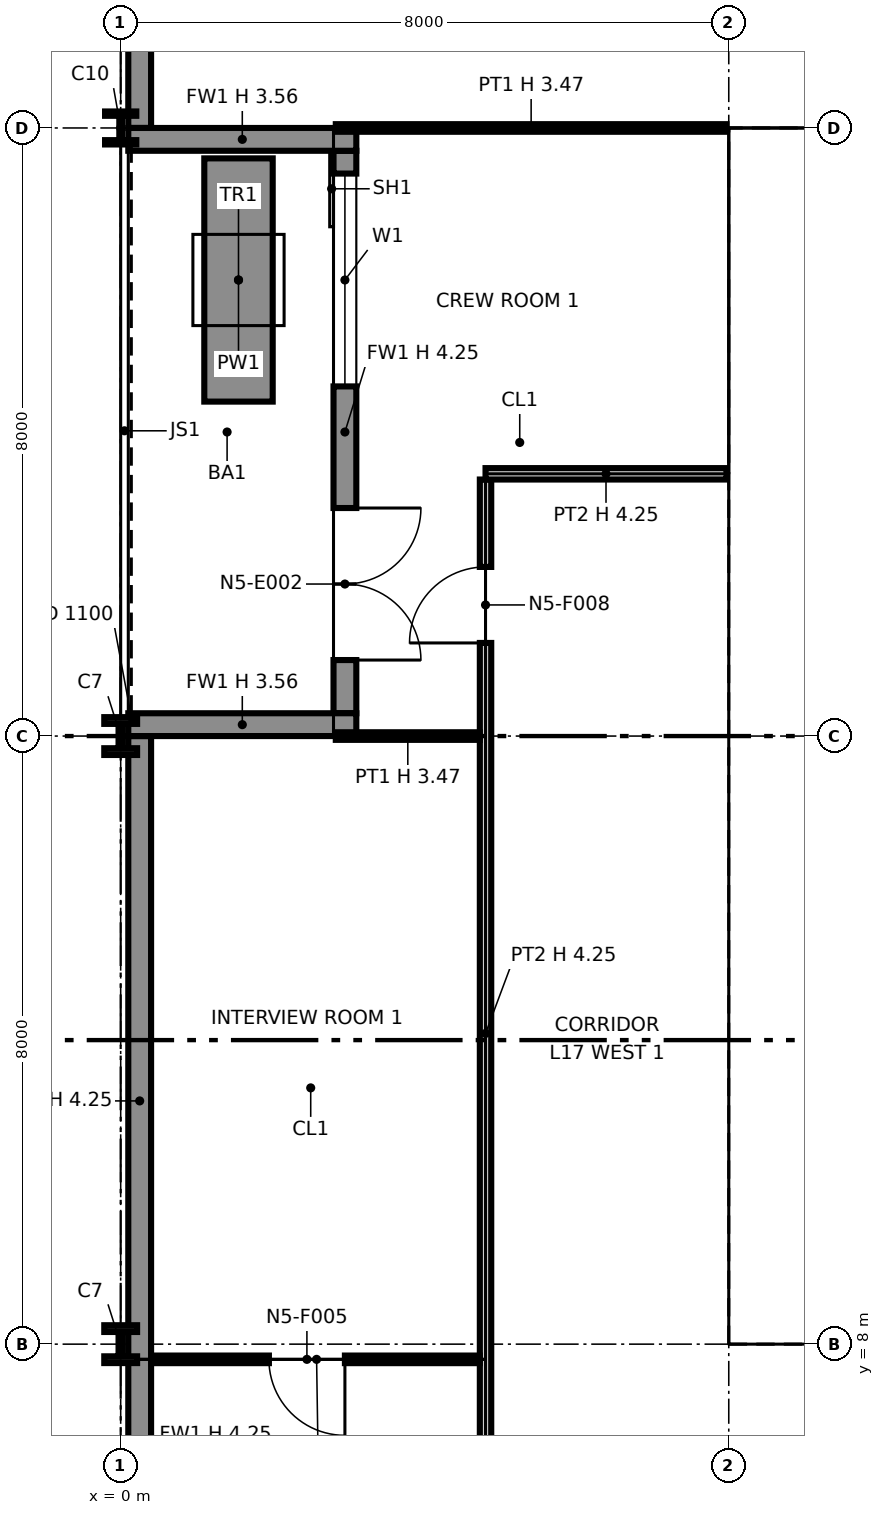
"""IFC4 building model, lengths in metres.
Left out: names, types, materials, properties, quantities, classifications, styles, units other than length and angle.
Written with IfcOpenShell. Run it as: python <this file> out.ifc"""

import sys

from ifc_helpers import new_model, si_unit, direction, frame, frame_2d, origin, origin_2d, place, context, subcontext, project, spatial, polyline, rectangle, i_section, outline, extrude, element, fill, save


model = new_model("IFC4")
c1 = context("Model", 3, precision=1e-05, world=origin(), true_north=direction((0.0, 1.0)))
c2 = subcontext(c1, "Body", "Model", "MODEL_VIEW")
j1 = project(units=[si_unit("LENGTHUNIT", "METRE"), si_unit("PLANEANGLEUNIT", "RADIAN")], contexts=[c1])
p1 = place(None, origin())
s1 = spatial("IfcSite", under=j1, at=p1, CompositionType="ELEMENT")
p2 = place(p1, origin())
s2 = spatial("IfcBuilding", under=s1, at=p2, CompositionType="ELEMENT")
p3 = place(p2, frame((0.0, 0.0, 92.0)))
s3 = spatial("IfcBuildingStorey", under=s2, at=p3, CompositionType="ELEMENT", Elevation=92.0)
for number, where, z_axis, x_axis in (
    (1, (0.0, 8.0, 0.0), (0.0, 0.0, 1.0), (1.0, 0.0, 0.0)),
    (2, (0.0, 16.0, 0.0), (0.0, 0.0, 1.0), (1.0, 0.0, 0.0)),
):
    element("IfcColumn", number, at=place(p3, frame(where, z_axis=z_axis, x_axis=x_axis)), inside=s3, PredefinedType="COLUMN", context=c2, shape_type="SweptSolid", body=[
        extrude(i_section(OverallWidth=0.432, OverallDepth=0.498, WebThickness=0.056, FlangeThickness=0.089, at=origin_2d()), origin(), (0.0, 0.0, 1.0), 4.25),
    ])
p4 = place(p3, frame((0.0, 24.0, 0.0), z_axis=(0.0, 0.0, 1.0), x_axis=(1.0, 0.0, 0.0)))
e3 = element("IfcColumn", 3, at=p4, inside=s3, PredefinedType="COLUMN", context=c2, shape_type="SweptSolid", body=[
    extrude(i_section(OverallWidth=0.411, OverallDepth=0.434, WebThickness=0.036, FlangeThickness=0.057, at=origin_2d()), origin(), (0.0, 0.0, 1.0), 4.25),
])
for number, where, z_axis, x_axis in (
    (4, (8.0, 8.0, 0.0), (0.0, 0.0, 1.0), (1.0, 0.0, 0.0)),
    (5, (8.0, 16.0, 0.0), (0.0, 0.0, 1.0), (1.0, 0.0, 0.0)),
):
    element("IfcColumn", number, at=place(p3, frame(where, z_axis=z_axis, x_axis=x_axis)), inside=s3, PredefinedType="COLUMN", context=c2, shape_type="SweptSolid", body=[
        extrude(i_section(OverallWidth=0.406, OverallDepth=0.417, WebThickness=0.03, FlangeThickness=0.048, at=origin_2d()), origin(), (0.0, 0.0, 1.0), 4.25),
    ])
p5 = place(p3, frame((8.0, 24.0, 0.0), z_axis=(0.0, 0.0, 1.0), x_axis=(1.0, 0.0, 0.0)))
e6 = element("IfcColumn", 6, at=p5, inside=s3, PredefinedType="COLUMN", context=c2, shape_type="SweptSolid", body=[
    extrude(i_section(OverallWidth=0.411, OverallDepth=0.434, WebThickness=0.036, FlangeThickness=0.057, at=origin_2d()), origin(), (0.0, 0.0, 1.0), 4.25),
])
p6 = place(p3, frame((0.25, 32.0, 0.0), z_axis=(0.0, 0.0, 1.0), x_axis=(0.0, -1.0, 0.0)))
e7 = element("IfcWall", 7, at=p6, inside=s3, PredefinedType="SOLIDWALL", context=c2, shape_type="SweptSolid", body=[
    extrude(rectangle(XDim=8.0, YDim=0.3, at=frame_2d((4.0, 0.0))), origin(), (0.0, 0.0, 1.0), 4.25),
])
p7 = place(p3, frame((2.95, 23.7, 0.0), z_axis=(0.0, 0.0, 1.0), x_axis=(0.0, -1.0, 0.0)))
e8 = element("IfcWall", 8, at=p7, inside=s3, PredefinedType="SOLIDWALL", context=c2, shape_type="SweptSolid", body=[
    extrude(rectangle(XDim=7.4, YDim=0.3, at=frame_2d((3.7, 0.0))), origin(), (0.0, 0.0, 1.0), 4.25),
])
p8 = place(p7, frame((0.3, 0.0, 0.9)))
e9 = element("IfcOpeningElement", 9, at=p8, cuts=e8, PredefinedType="OPENING", context=c2, shape_type="SweptSolid", body=[
    extrude(rectangle(XDim=2.8, YDim=2.2, at=frame_2d((1.4, 1.1))), frame((0.0, 0.16, 0.0), z_axis=(0.0, -1.0, 0.0), x_axis=(1.0, 0.0, 0.0)), (0.0, 0.0, 1.0), 0.32),
])
p9 = place(p7, frame((4.7, 0.0, 0.0)))
e10 = element("IfcOpeningElement", 10, at=p9, cuts=e8, PredefinedType="OPENING", context=c2, shape_type="SweptSolid", body=[
    extrude(rectangle(XDim=2.0, YDim=2.4, at=frame_2d((1.0, 1.2))), frame((0.0, 0.16, 0.0), z_axis=(0.0, -1.0, 0.0), x_axis=(1.0, 0.0, 0.0)), (0.0, 0.0, 1.0), 0.32),
])
for number, where, z_axis, x_axis in (
    (11, (0.1, 23.85, 0.0), (0.0, 0.0, 1.0), (1.0, 0.0, 0.0)),
    (12, (0.1, 16.15, 0.0), (0.0, 0.0, 1.0), (1.0, 0.0, 0.0)),
):
    element("IfcWall", number, at=place(p3, frame(where, z_axis=z_axis, x_axis=x_axis)), inside=s3, PredefinedType="SOLIDWALL", context=c2, shape_type="SweptSolid", body=[
        extrude(rectangle(XDim=3.0, YDim=0.3, at=frame_2d((1.5, 0.0))), origin(), (0.0, 0.0, 1.0), 3.556),
    ])
p10 = place(p3, frame((0.25, 16.0, 0.0), z_axis=(0.0, 0.0, 1.0), x_axis=(0.0, -1.0, 0.0)))
e13 = element("IfcWall", 13, at=p10, inside=s3, PredefinedType="SOLIDWALL", context=c2, shape_type="SweptSolid", body=[
    extrude(rectangle(XDim=9.6, YDim=0.3, at=frame_2d((4.8, 0.0))), origin(), (0.0, 0.0, 1.0), 4.25),
])
p11 = place(p3, frame((1.55, 23.6, 0.0), z_axis=(0.0, 0.0, 1.0), x_axis=(0.0, -1.0, 0.0)))
e14 = element("IfcWall", 14, at=p11, inside=s3, PredefinedType="SOLIDWALL", context=c2, shape_type="SweptSolid", body=[
    extrude(rectangle(XDim=3.2, YDim=0.9, at=frame_2d((1.6, 0.0))), origin(), (0.0, 0.0, 1.0), 0.6),
])
p12 = place(p3, frame((8.65, 8.75, 0.0), z_axis=(0.0, 0.0, 1.0), x_axis=(1.0, 0.0, 0.0)))
e15 = element("IfcWall", 15, at=p12, inside=s3, PredefinedType="PARTITIONING", context=c2, shape_type="SweptSolid", body=[
    extrude(outline(polyline([(0.0, 0.0), (14.7, 0.0), (14.7, 4.25), (7.469, 4.25), (7.469, 3.632), (7.231, 3.632), (7.23, 4.25), (0.0, 4.25), (0.0, 0.0)])), frame((0.0, 0.1, 0.0), z_axis=(0.0, -1.0, 0.0), x_axis=(1.0, 0.0, 0.0)), (0.0, 0.0, 1.0), 0.2),
])
p13 = place(p12, frame((1.3, 0.0, 0.0)))
e16 = element("IfcOpeningElement", 16, at=p13, cuts=e15, PredefinedType="OPENING", context=c2, shape_type="SweptSolid", body=[
    extrude(rectangle(XDim=1.4, YDim=2.1, at=frame_2d((0.7, 1.05))), frame((0.0, 0.11, 0.0), z_axis=(0.0, -1.0, 0.0), x_axis=(1.0, 0.0, 0.0)), (0.0, 0.0, 1.0), 0.22),
])
p14 = place(p12, frame((4.6, 0.0, 0.0)))
e17 = element("IfcOpeningElement", 17, at=p14, cuts=e15, PredefinedType="OPENING", context=c2, shape_type="SweptSolid", body=[
    extrude(rectangle(XDim=1.4, YDim=2.1, at=frame_2d((0.7, 1.05))), frame((0.0, 0.11, 0.0), z_axis=(0.0, -1.0, 0.0), x_axis=(1.0, 0.0, 0.0)), (0.0, 0.0, 1.0), 0.22),
])
p15 = place(p12, frame((10.4, 0.0, 0.0)))
e18 = element("IfcOpeningElement", 18, at=p15, cuts=e15, PredefinedType="OPENING", context=c2, shape_type="SweptSolid", body=[
    extrude(rectangle(XDim=1.2, YDim=2.1, at=frame_2d((0.6, 1.05))), frame((0.0, 0.11, 0.0), z_axis=(0.0, -1.0, 0.0), x_axis=(1.0, 0.0, 0.0)), (0.0, 0.0, 1.0), 0.22),
])
p16 = place(p3, frame((8.75, 8.85, 0.0), z_axis=(0.0, 0.0, 1.0), x_axis=(0.0, 1.0, 0.0)))
e19 = element("IfcWall", 19, at=p16, inside=s3, PredefinedType="PARTITIONING", context=c2, shape_type="SweptSolid", body=[
    extrude(outline(polyline([(0.0, 0.0), (14.3, 0.0), (14.3, 4.25), (10.231, 4.25), (10.23, 3.789), (10.07, 3.789), (10.069, 4.25), (7.27, 4.25), (7.269, 3.632), (7.031, 3.632), (7.031, 4.25), (0.0, 4.25), (0.0, 0.0)])), frame((0.0, 0.1, 0.0), z_axis=(0.0, -1.0, 0.0), x_axis=(1.0, 0.0, 0.0)), (0.0, 0.0, 1.0), 0.2),
])
p17 = place(p16, frame((8.3, 0.0, 0.0)))
e20 = element("IfcOpeningElement", 20, at=p17, cuts=e19, PredefinedType="OPENING", context=c2, shape_type="SweptSolid", body=[
    extrude(rectangle(XDim=1.8, YDim=2.1, at=frame_2d((0.9, 1.05))), frame((0.0, 0.11, 0.0), z_axis=(0.0, -1.0, 0.0), x_axis=(1.0, 0.0, 0.0)), (0.0, 0.0, 1.0), 0.22),
])
p18 = place(p3, frame((8.65, 23.25, 0.0), z_axis=(0.0, 0.0, 1.0), x_axis=(1.0, 0.0, 0.0)))
e21 = element("IfcWall", 21, at=p18, inside=s3, PredefinedType="PARTITIONING", context=c2, shape_type="SweptSolid", body=[
    extrude(outline(polyline([(0.0, 0.0), (14.7, 0.0), (14.7, 4.25), (7.469, 4.25), (7.469, 3.632), (7.231, 3.632), (7.23, 4.25), (0.0, 4.25), (0.0, 0.0)])), frame((0.0, 0.1, 0.0), z_axis=(0.0, -1.0, 0.0), x_axis=(1.0, 0.0, 0.0)), (0.0, 0.0, 1.0), 0.2),
])
p19 = place(p3, frame((8.85, 16.0, 0.0), z_axis=(0.0, 0.0, 1.0), x_axis=(1.0, 0.0, 0.0)))
e22 = element("IfcWall", 22, at=p19, inside=s3, PredefinedType="PARTITIONING", context=c2, shape_type="SweptSolid", body=[
    extrude(rectangle(XDim=6.931, YDim=0.6, at=frame_2d((3.466, 0.0))), origin(), (0.0, 0.0, 1.0), 3.632),
])
p20 = place(p3, frame((8.85, 19.9, 0.0), z_axis=(0.0, 0.0, 1.0), x_axis=(1.0, 0.0, 0.0)))
e23 = element("IfcWall", 23, at=p20, inside=s3, PredefinedType="PARTITIONING", context=c2, shape_type="SweptSolid", body=[
    extrude(outline(polyline([(0.0, 0.0), (14.3, 0.0), (14.3, 3.789), (7.27, 3.789), (7.269, 3.632), (7.031, 3.632), (7.031, 4.25), (0.0, 4.25), (0.0, 0.0)])), frame((0.0, 0.1, 0.0), z_axis=(0.0, -1.0, 0.0), x_axis=(1.0, 0.0, 0.0)), (0.0, 0.0, 1.0), 0.2),
])
p21 = place(p20, frame((6.35, 0.0, 0.0)))
e24 = element("IfcOpeningElement", 24, at=p21, cuts=e23, PredefinedType="OPENING", context=c2, shape_type="SweptSolid", body=[
    extrude(rectangle(XDim=0.9, YDim=2.1, at=frame_2d((0.45, 1.05))), frame((0.0, 0.11, 0.0), z_axis=(0.0, -1.0, 0.0), x_axis=(1.0, 0.0, 0.0)), (0.0, 0.0, 1.0), 0.22),
])
p22 = place(p20, frame((9.0, 0.0, 0.0)))
e25 = element("IfcOpeningElement", 25, at=p22, cuts=e23, PredefinedType="OPENING", context=c2, shape_type="SweptSolid", body=[
    extrude(rectangle(XDim=0.9, YDim=2.1, at=frame_2d((0.45, 1.05))), frame((0.0, 0.11, 0.0), z_axis=(0.0, -1.0, 0.0), x_axis=(1.0, 0.0, 0.0)), (0.0, 0.0, 1.0), 0.22),
])
p23 = place(p20, frame((11.35, 0.0, 0.0)))
e26 = element("IfcOpeningElement", 26, at=p23, cuts=e23, PredefinedType="OPENING", context=c2, shape_type="SweptSolid", body=[
    extrude(rectangle(XDim=1.0, YDim=2.1, at=frame_2d((0.5, 1.05))), frame((0.0, 0.11, 0.0), z_axis=(0.0, -1.0, 0.0), x_axis=(1.0, 0.0, 0.0)), (0.0, 0.0, 1.0), 0.22),
])
p24 = place(p20, frame((13.125, 0.0, 0.0)))
e27 = element("IfcOpeningElement", 27, at=p24, cuts=e23, PredefinedType="OPENING", context=c2, shape_type="SweptSolid", body=[
    extrude(rectangle(XDim=0.9, YDim=2.1, at=frame_2d((0.45, 1.05))), frame((0.0, 0.11, 0.0), z_axis=(0.0, -1.0, 0.0), x_axis=(1.0, 0.0, 0.0)), (0.0, 0.0, 1.0), 0.22),
])
p25 = place(p3, frame((4.8, 4.8, 0.0), z_axis=(0.0, 0.0, 1.0), x_axis=(0.0, 1.0, 0.0)))
e28 = element("IfcWall", 28, at=p25, inside=s3, PredefinedType="PARTITIONING", context=c2, shape_type="SweptSolid", body=[
    extrude(outline(polyline([(0.0, 0.0), (14.575, 0.0), (14.575, 4.25), (11.5, 4.25), (11.498, 3.47), (10.902, 3.47), (10.9, 4.25), (7.5, 4.25), (7.498, 3.47), (6.902, 3.47), (6.9, 4.25), (3.5, 4.25), (3.498, 3.47), (2.902, 3.47), (2.9, 4.25), (0.0, 4.25), (0.0, 0.0)])), frame((0.0, 0.075, 0.0), z_axis=(0.0, -1.0, 0.0), x_axis=(1.0, 0.0, 0.0)), (0.0, 0.0, 1.0), 0.15),
])
p26 = place(p25, frame((12.425, 0.0, 0.0)))
e29 = element("IfcOpeningElement", 29, at=p26, cuts=e28, PredefinedType="OPENING", context=c2, shape_type="SweptSolid", body=[
    extrude(rectangle(XDim=1.0, YDim=2.1, at=frame_2d((0.5, 1.05))), frame((0.0, 0.085, 0.0), z_axis=(0.0, -1.0, 0.0), x_axis=(1.0, 0.0, 0.0)), (0.0, 0.0, 1.0), 0.17),
])
p27 = place(p3, frame((0.43, 7.8, 0.0), z_axis=(0.0, 0.0, 1.0), x_axis=(1.0, 0.0, 0.0)))
e30 = element("IfcWall", 30, at=p27, inside=s3, PredefinedType="PARTITIONING", context=c2, shape_type="SweptSolid", body=[
    extrude(rectangle(XDim=4.295, YDim=0.1, at=frame_2d((2.147, 0.0))), origin(), (0.0, 0.0, 1.0), 4.25),
])
p28 = place(p27, frame((2.52, 0.0, 0.0), z_axis=(0.0, 0.0, 1.0), x_axis=(-1.0, 0.0, 0.0)))
e31 = element("IfcOpeningElement", 31, at=p28, cuts=e30, PredefinedType="OPENING", context=c2, shape_type="SweptSolid", body=[
    extrude(rectangle(XDim=1.0, YDim=2.1, at=frame_2d((0.5, 1.05))), frame((0.0, 0.06, 0.0), z_axis=(0.0, -1.0, 0.0), x_axis=(1.0, 0.0, 0.0)), (0.0, 0.0, 1.0), 0.12),
])
p29 = place(p3, frame((2.83, 16.0, 0.0), z_axis=(0.0, 0.0, 1.0), x_axis=(1.0, 0.0, 0.0)))
e32 = element("IfcWall", 32, at=p29, inside=s3, PredefinedType="PARTITIONING", context=c2, shape_type="SweptSolid", body=[
    extrude(rectangle(XDim=1.895, YDim=0.1, at=frame_2d((0.948, 0.0))), origin(), (0.0, 0.0, 1.0), 3.47),
])
p30 = place(p3, frame((4.8, 19.45, 0.0), z_axis=(0.0, 0.0, 1.0), x_axis=(1.0, 0.0, 0.0)))
e33 = element("IfcWall", 33, at=p30, inside=s3, PredefinedType="PARTITIONING", context=c2, shape_type="SweptSolid", body=[
    extrude(rectangle(XDim=3.17, YDim=0.15, at=frame_2d((1.585, 0.0))), origin(), (0.0, 0.0, 1.0), 4.25),
])
p31 = place(p3, frame((2.83, 24.0, 0.0), z_axis=(0.0, 0.0, 1.0), x_axis=(1.0, 0.0, 0.0)))
e34 = element("IfcWall", 34, at=p31, inside=s3, PredefinedType="PARTITIONING", context=c2, shape_type="SweptSolid", body=[
    extrude(rectangle(XDim=5.14, YDim=0.1, at=frame_2d((2.57, 0.0))), origin(), (0.0, 0.0, 1.0), 3.47),
])
p32 = place(p8, origin())
e35 = element("IfcWindow", 35, at=p32, inside=s3, PartitioningType="SINGLE_PANEL", PredefinedType="WINDOW", context=c2, shape_type="SweptSolid", body=[
    extrude(rectangle(XDim=2.8, YDim=2.2, at=frame_2d((1.4, 1.1))), frame((0.0, 0.03, 0.0), z_axis=(0.0, -1.0, 0.0), x_axis=(1.0, 0.0, 0.0)), (0.0, 0.0, 1.0), 0.06),
])
fill(e9, e35)
p33 = place(p9, origin())
e36 = element("IfcDoor", 36, at=p33, inside=s3, OperationType="DOUBLE_DOOR_SINGLE_SWING", PredefinedType="DOOR", context=c2, shape_type="SweptSolid", body=[
    extrude(rectangle(XDim=2.0, YDim=2.4, at=frame_2d((1.0, 1.2))), frame((0.0, 0.025, 0.0), z_axis=(0.0, -1.0, 0.0), x_axis=(1.0, 0.0, 0.0)), (0.0, 0.0, 1.0), 0.05),
])
fill(e10, e36)
p34 = place(p17, origin())
e37 = element("IfcDoor", 37, at=p34, inside=s3, OperationType="DOUBLE_DOOR_SINGLE_SWING", PredefinedType="NOTDEFINED", context=c2, shape_type="SweptSolid", body=[
    extrude(rectangle(XDim=1.8, YDim=2.1, at=frame_2d((0.9, 1.05))), frame((0.0, 0.025, 0.0), z_axis=(0.0, -1.0, 0.0), x_axis=(1.0, 0.0, 0.0)), (0.0, 0.0, 1.0), 0.05),
])
fill(e20, e37)
p35 = place(p28, origin())
e38 = element("IfcDoor", 38, at=p35, inside=s3, OperationType="SINGLE_SWING_LEFT", PredefinedType="DOOR", context=c2, shape_type="SweptSolid", body=[
    extrude(rectangle(XDim=1.0, YDim=2.1, at=frame_2d((0.5, 1.05))), frame((0.0, 0.025, 0.0), z_axis=(0.0, -1.0, 0.0), x_axis=(1.0, 0.0, 0.0)), (0.0, 0.0, 1.0), 0.05),
])
fill(e31, e38)
p36 = place(p26, origin())
e39 = element("IfcDoor", 39, at=p36, inside=s3, OperationType="SINGLE_SWING_LEFT", PredefinedType="DOOR", context=c2, shape_type="SweptSolid", body=[
    extrude(rectangle(XDim=1.0, YDim=2.1, at=frame_2d((0.5, 1.05))), frame((0.0, 0.025, 0.0), z_axis=(0.0, -1.0, 0.0), x_axis=(1.0, 0.0, 0.0)), (0.0, 0.0, 1.0), 0.05),
])
fill(e29, e39)
save(model, sys.argv[1])
